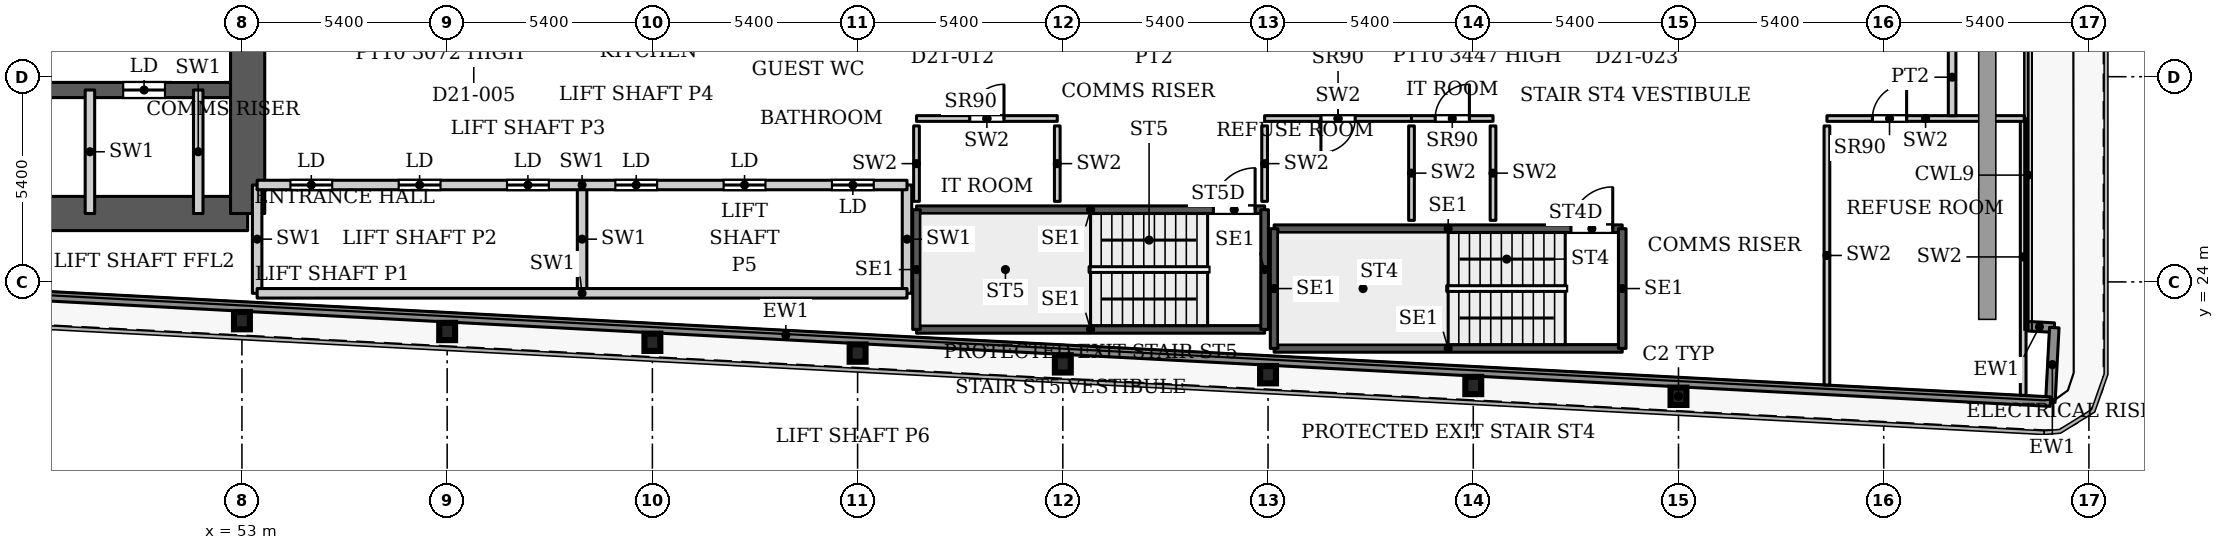
"""IFC4 building model, lengths in metres.
Left out: names, types, materials, properties, quantities, classifications, styles, units other than length and angle.
Written with IfcOpenShell. Run it as: python <this file> out.ifc"""

import sys

from ifc_helpers import new_model, si_unit, direction, frame, frame_2d, origin, origin_2d, place, context, subcontext, project, spatial, rectangle, i_section, extrude, source, transform, mapped, element, fill, save


model = new_model("IFC4")
c1 = context("Model", 3, precision=1e-05, world=origin(), true_north=direction((0.0, 1.0)))
c2 = subcontext(c1, "Body", "Model", "MODEL_VIEW")
j1 = project(units=[si_unit("LENGTHUNIT", "METRE"), si_unit("PLANEANGLEUNIT", "RADIAN")], contexts=[c1])
p1 = place(None, origin())
s1 = spatial("IfcSite", under=j1, at=p1, CompositionType="ELEMENT")
p2 = place(p1, origin())
s2 = spatial("IfcBuilding", under=s1, at=p2, CompositionType="ELEMENT")
p3 = place(p2, frame((0.0, 0.0, 98.0)))
s3 = spatial("IfcBuildingStorey", under=s2, at=p3, CompositionType="ELEMENT", Elevation=98.0)
for number, where, z_axis, x_axis in (
    (1, (90.8, 20.99, 0.0), (0.0, 0.0, 1.0), (1.0, 0.0, 0.0)),
    (2, (85.4, 21.274, 0.0), (0.0, 0.0, 1.0), (1.0, 0.0, 0.0)),
    (3, (80.0, 21.558, 0.0), (0.0, 0.0, 1.0), (1.0, 0.0, 0.0)),
    (4, (74.6, 21.843, 0.0), (0.0, 0.0, 1.0), (1.0, 0.0, 0.0)),
    (5, (69.2, 22.127, 0.0), (0.0, 0.0, 1.0), (1.0, 0.0, 0.0)),
    (6, (63.8, 22.411, 0.0), (0.0, 0.0, 1.0), (1.0, 0.0, 0.0)),
    (7, (58.4, 22.695, 0.0), (0.0, 0.0, 1.0), (1.0, 0.0, 0.0)),
    (8, (53.0, 22.98, 0.0), (0.0, 0.0, 1.0), (1.0, 0.0, 0.0)),
):
    element("IfcColumn", number, at=place(p3, frame(where, z_axis=z_axis, x_axis=x_axis)), inside=s3, PredefinedType="COLUMN", context=c2, shape_type="SweptSolid", body=[
        extrude(i_section(OverallWidth=0.418, OverallDepth=0.455, WebThickness=0.042, FlangeThickness=0.068, FilletRadius=0.014, at=origin_2d()), origin(), (0.0, 0.0, 1.0), 3.9),
    ])
p4 = place(p3, frame((34.75, 25.8, 0.0), z_axis=(0.0, 0.0, 1.0), x_axis=(1.0, 0.0, 0.0)))
e9 = element("IfcWall", 9, at=p4, inside=s3, PredefinedType="SHEAR", context=c2, shape_type="SweptSolid", body=[
    extrude(rectangle(XDim=18.4, YDim=0.9, at=frame_2d((9.2, 0.0))), origin(), (0.0, 0.0, 1.0), 3.9),
])
p5 = place(p3, frame((34.75, 29.05, 0.0), z_axis=(0.0, 0.0, 1.0), x_axis=(1.0, 0.0, 0.0)))
e10 = element("IfcWall", 10, at=p5, inside=s3, PredefinedType="SHEAR", context=c2, shape_type="SweptSolid", body=[
    extrude(rectangle(XDim=18.4, YDim=0.4, at=frame_2d((9.2, 0.0))), origin(), (0.0, 0.0, 1.0), 3.9),
])
p6 = place(p5, frame((15.125, 0.0, 0.0)))
e11 = element("IfcOpeningElement", 11, at=p6, cuts=e10, PredefinedType="OPENING", context=c2, shape_type="SweptSolid", body=[
    extrude(rectangle(XDim=1.1, YDim=2.2, at=frame_2d((0.55, 1.1))), frame((0.0, 0.21, 0.0), z_axis=(0.0, -1.0, 0.0), x_axis=(1.0, 0.0, 0.0)), (0.0, 0.0, 1.0), 0.42),
])
p7 = place(p3, frame((53.15, 25.8, 0.0), z_axis=(0.0, 0.0, 1.0), x_axis=(0.0, 1.0, 0.0)))
e12 = element("IfcWall", 12, at=p7, inside=s3, PredefinedType="SHEAR", context=c2, shape_type="SweptSolid", body=[
    extrude(rectangle(XDim=10.4, YDim=0.9, at=frame_2d((5.2, 0.0))), origin(), (0.0, 0.0, 1.0), 3.9),
])
p8 = place(p3, frame((99.907, 22.839, 0.0), z_axis=(0.0, 0.0, 1.0), x_axis=(0.998561284263, -0.053622398031, 0.0)))
e13 = element("IfcWall", 13, at=p8, inside=s3, PredefinedType="SOLIDWALL", context=c2, shape_type="SweptSolid", body=[
    extrude(rectangle(XDim=0.783, YDim=0.25, at=frame_2d((0.392, 0.0))), origin(), (0.0, 0.0, 1.0), 3.75),
])
p9 = place(p3, frame((100.689, 22.797, 0.0), z_axis=(0.0, 0.0, 1.0), x_axis=(-0.052841433274, -0.998602915542, 0.0)))
e14 = element("IfcWall", 14, at=p9, inside=s3, PredefinedType="SOLIDWALL", context=c2, shape_type="SweptSolid", body=[
    extrude(rectangle(XDim=1.95, YDim=0.25, at=frame_2d((0.975, 0.0))), origin(), (0.0, 0.0, 1.0), 3.75),
])
p10 = place(p3, frame((100.586, 20.85, 0.0), z_axis=(0.0, 0.0, 1.0), x_axis=(-0.99861746497, 0.052565755559, 0.0)))
e15 = element("IfcWall", 15, at=p10, inside=s3, PredefinedType="SOLIDWALL", context=c2, shape_type="SweptSolid", body=[
    extrude(rectangle(XDim=66.639, YDim=0.25, at=frame_2d((33.319, 0.0))), origin(), (0.0, 0.0, 1.0), 3.75),
])
p11 = place(p3, frame((80.16, 22.25, 0.0), z_axis=(0.0, 0.0, 1.0), x_axis=(1.0, 0.0, 0.0)))
e16 = element("IfcWall", 16, at=p11, inside=s3, PredefinedType="SHEAR", context=c2, shape_type="SweptSolid", body=[
    extrude(rectangle(XDim=9.16, YDim=0.2, at=frame_2d((4.58, 0.0))), origin(), (0.0, 0.0, 1.0), 3.9),
])
p12 = place(p3, frame((80.16, 25.4, 0.0), z_axis=(0.0, 0.0, 1.0), x_axis=(1.0, 0.0, 0.0)))
e17 = element("IfcWall", 17, at=p12, inside=s3, PredefinedType="SHEAR", context=c2, shape_type="SweptSolid", body=[
    extrude(rectangle(XDim=9.16, YDim=0.2, at=frame_2d((4.58, 0.0))), origin(), (0.0, 0.0, 1.0), 3.9),
])
p13 = place(p12, frame((7.81, 0.0, 0.0)))
e18 = element("IfcOpeningElement", 18, at=p13, cuts=e17, PredefinedType="OPENING", context=c2, shape_type="SweptSolid", body=[
    extrude(rectangle(XDim=1.1, YDim=2.2, at=frame_2d((0.55, 1.1))), frame((0.0, 0.11, 0.0), z_axis=(0.0, -1.0, 0.0), x_axis=(1.0, 0.0, 0.0)), (0.0, 0.0, 1.0), 0.22),
])
for number, where, z_axis, x_axis in (
    (19, (80.16, 22.25, 0.0), (0.0, 0.0, 1.0), (0.0, 1.0, 0.0)),
    (20, (89.32, 22.25, 0.0), (0.0, 0.0, 1.0), (0.0, 1.0, 0.0)),
):
    element("IfcWall", number, at=place(p3, frame(where, z_axis=z_axis, x_axis=x_axis)), inside=s3, PredefinedType="SHEAR", context=c2, shape_type="SweptSolid", body=[
        extrude(rectangle(XDim=3.15, YDim=0.2, at=frame_2d((1.575, 0.0))), origin(), (0.0, 0.0, 1.0), 3.9),
    ])
p14 = place(p3, frame((70.75, 22.75, 0.0), z_axis=(0.0, 0.0, 1.0), x_axis=(1.0, 0.0, 0.0)))
e21 = element("IfcWall", 21, at=p14, inside=s3, PredefinedType="SHEAR", context=c2, shape_type="SweptSolid", body=[
    extrude(rectangle(XDim=9.16, YDim=0.2, at=frame_2d((4.58, 0.0))), origin(), (0.0, 0.0, 1.0), 3.9),
])
p15 = place(p3, frame((70.75, 25.9, 0.0), z_axis=(0.0, 0.0, 1.0), x_axis=(1.0, 0.0, 0.0)))
e22 = element("IfcWall", 22, at=p15, inside=s3, PredefinedType="SHEAR", context=c2, shape_type="SweptSolid", body=[
    extrude(rectangle(XDim=9.16, YDim=0.2, at=frame_2d((4.58, 0.0))), origin(), (0.0, 0.0, 1.0), 3.9),
])
p16 = place(p15, frame((7.81, 0.0, 0.0)))
e23 = element("IfcOpeningElement", 23, at=p16, cuts=e22, PredefinedType="OPENING", context=c2, shape_type="SweptSolid", body=[
    extrude(rectangle(XDim=1.1, YDim=2.2, at=frame_2d((0.55, 1.1))), frame((0.0, 0.11, 0.0), z_axis=(0.0, -1.0, 0.0), x_axis=(1.0, 0.0, 0.0)), (0.0, 0.0, 1.0), 0.22),
])
for number, where, z_axis, x_axis in (
    (24, (70.75, 22.75, 0.0), (0.0, 0.0, 1.0), (0.0, 1.0, 0.0)),
    (25, (79.91, 22.75, 0.0), (0.0, 0.0, 1.0), (0.0, 1.0, 0.0)),
):
    element("IfcWall", number, at=place(p3, frame(where, z_axis=z_axis, x_axis=x_axis)), inside=s3, PredefinedType="SHEAR", context=c2, shape_type="SweptSolid", body=[
        extrude(rectangle(XDim=3.15, YDim=0.2, at=frame_2d((1.575, 0.0))), origin(), (0.0, 0.0, 1.0), 3.9),
    ])
for number, where, z_axis, x_axis in (
    (26, (49.0, 25.8, 0.0), (0.0, 0.0, 1.0), (0.0, 1.0, 0.0)),
    (27, (51.85, 25.8, 0.0), (0.0, 0.0, 1.0), (0.0, 1.0, 0.0)),
):
    element("IfcWall", number, at=place(p3, frame(where, z_axis=z_axis, x_axis=x_axis)), inside=s3, PredefinedType="PARTITIONING", context=c2, shape_type="SweptSolid", body=[
        extrude(rectangle(XDim=3.25, YDim=0.25, at=frame_2d((1.625, 0.0))), origin(), (0.0, 0.0, 1.0), 3.9),
    ])
for number, where, z_axis, x_axis in (
    (28, (53.4, 23.7, 0.0), (0.0, 0.0, 1.0), (0.0, 1.0, 0.0)),
    (29, (61.95, 23.7, 0.0), (0.0, 0.0, 1.0), (0.0, 1.0, 0.0)),
    (30, (70.5, 23.7, 0.0), (0.0, 0.0, 1.0), (0.0, 1.0, 0.0)),
):
    element("IfcWall", number, at=place(p3, frame(where, z_axis=z_axis, x_axis=x_axis)), inside=s3, PredefinedType="PARTITIONING", context=c2, shape_type="SweptSolid", body=[
        extrude(rectangle(XDim=2.85, YDim=0.25, at=frame_2d((1.425, 0.0))), origin(), (0.0, 0.0, 1.0), 3.9),
    ])
p17 = place(p3, frame((53.4, 23.7, 0.0), z_axis=(0.0, 0.0, 1.0), x_axis=(1.0, 0.0, 0.0)))
e31 = element("IfcWall", 31, at=p17, inside=s3, PredefinedType="PARTITIONING", context=c2, shape_type="SweptSolid", body=[
    extrude(rectangle(XDim=17.1, YDim=0.25, at=frame_2d((8.55, 0.0))), origin(), (0.0, 0.0, 1.0), 3.9),
])
p18 = place(p3, frame((53.4, 26.55, 0.0), z_axis=(0.0, 0.0, 1.0), x_axis=(1.0, 0.0, 0.0)))
e32 = element("IfcWall", 32, at=p18, inside=s3, PredefinedType="PARTITIONING", context=c2, shape_type="SweptSolid", body=[
    extrude(rectangle(XDim=17.1, YDim=0.25, at=frame_2d((8.55, 0.0))), origin(), (0.0, 0.0, 1.0), 3.9),
])
p19 = place(p18, frame((0.875, 0.0, 0.0)))
e33 = element("IfcOpeningElement", 33, at=p19, cuts=e32, PredefinedType="OPENING", context=c2, shape_type="SweptSolid", body=[
    extrude(rectangle(XDim=1.1, YDim=2.2, at=frame_2d((0.55, 1.1))), frame((0.0, 0.135, 0.0), z_axis=(0.0, -1.0, 0.0), x_axis=(1.0, 0.0, 0.0)), (0.0, 0.0, 1.0), 0.27),
])
p20 = place(p18, frame((3.725, 0.0, 0.0)))
e34 = element("IfcOpeningElement", 34, at=p20, cuts=e32, PredefinedType="OPENING", context=c2, shape_type="SweptSolid", body=[
    extrude(rectangle(XDim=1.1, YDim=2.2, at=frame_2d((0.55, 1.1))), frame((0.0, 0.135, 0.0), z_axis=(0.0, -1.0, 0.0), x_axis=(1.0, 0.0, 0.0)), (0.0, 0.0, 1.0), 0.27),
])
p21 = place(p18, frame((6.575, 0.0, 0.0)))
e35 = element("IfcOpeningElement", 35, at=p21, cuts=e32, PredefinedType="OPENING", context=c2, shape_type="SweptSolid", body=[
    extrude(rectangle(XDim=1.1, YDim=2.2, at=frame_2d((0.55, 1.1))), frame((0.0, 0.135, 0.0), z_axis=(0.0, -1.0, 0.0), x_axis=(1.0, 0.0, 0.0)), (0.0, 0.0, 1.0), 0.27),
])
p22 = place(p18, frame((9.425, 0.0, 0.0)))
e36 = element("IfcOpeningElement", 36, at=p22, cuts=e32, PredefinedType="OPENING", context=c2, shape_type="SweptSolid", body=[
    extrude(rectangle(XDim=1.1, YDim=2.2, at=frame_2d((0.55, 1.1))), frame((0.0, 0.135, 0.0), z_axis=(0.0, -1.0, 0.0), x_axis=(1.0, 0.0, 0.0)), (0.0, 0.0, 1.0), 0.27),
])
p23 = place(p18, frame((12.275, 0.0, 0.0)))
e37 = element("IfcOpeningElement", 37, at=p23, cuts=e32, PredefinedType="OPENING", context=c2, shape_type="SweptSolid", body=[
    extrude(rectangle(XDim=1.1, YDim=2.2, at=frame_2d((0.55, 1.1))), frame((0.0, 0.135, 0.0), z_axis=(0.0, -1.0, 0.0), x_axis=(1.0, 0.0, 0.0)), (0.0, 0.0, 1.0), 0.27),
])
p24 = place(p18, frame((15.125, 0.0, 0.0)))
e38 = element("IfcOpeningElement", 38, at=p24, cuts=e32, PredefinedType="OPENING", context=c2, shape_type="SweptSolid", body=[
    extrude(rectangle(XDim=1.1, YDim=2.2, at=frame_2d((0.55, 1.1))), frame((0.0, 0.135, 0.0), z_axis=(0.0, -1.0, 0.0), x_axis=(1.0, 0.0, 0.0)), (0.0, 0.0, 1.0), 0.27),
])
p25 = place(p3, frame((70.75, 28.3, 0.0), z_axis=(0.0, 0.0, 1.0), x_axis=(1.0, 0.0, 0.0)))
e39 = element("IfcWall", 39, at=p25, inside=s3, PredefinedType="PARTITIONING", context=c2, shape_type="SweptSolid", body=[
    extrude(rectangle(XDim=3.704, YDim=0.15, at=frame_2d((1.852, 0.0))), origin(), (0.0, 0.0, 1.0), 3.9),
])
p26 = place(p25, frame((1.402, 0.0, 0.0)))
e40 = element("IfcOpeningElement", 40, at=p26, cuts=e39, PredefinedType="OPENING", context=c2, shape_type="SweptSolid", body=[
    extrude(rectangle(XDim=0.9, YDim=2.2, at=frame_2d((0.45, 1.1))), frame((0.0, 0.085, 0.0), z_axis=(0.0, -1.0, 0.0), x_axis=(1.0, 0.0, 0.0)), (0.0, 0.0, 1.0), 0.17),
])
for number, where, z_axis, x_axis in (
    (41, (70.75, 26.12, 0.0), (0.0, 0.0, 1.0), (0.0, 1.0, 0.0)),
    (42, (74.454, 26.12, 0.0), (0.0, 0.0, 1.0), (0.0, 1.0, 0.0)),
):
    element("IfcWall", number, at=place(p3, frame(where, z_axis=z_axis, x_axis=x_axis)), inside=s3, PredefinedType="PARTITIONING", context=c2, shape_type="SweptSolid", body=[
        extrude(rectangle(XDim=1.985, YDim=0.15, at=frame_2d((0.992, 0.0))), origin(), (0.0, 0.0, 1.0), 3.9),
    ])
p27 = place(p3, frame((79.91, 28.3, 0.0), z_axis=(0.0, 0.0, 1.0), x_axis=(1.0, 0.0, 0.0)))
e43 = element("IfcWall", 43, at=p27, inside=s3, PredefinedType="PARTITIONING", context=c2, shape_type="SweptSolid", body=[
    extrude(rectangle(XDim=3.865, YDim=0.15, at=frame_2d((1.933, 0.0))), origin(), (0.0, 0.0, 1.0), 3.9),
])
p28 = place(p27, frame((1.482, 0.0, 0.0)))
e44 = element("IfcOpeningElement", 44, at=p28, cuts=e43, PredefinedType="OPENING", context=c2, shape_type="SweptSolid", body=[
    extrude(rectangle(XDim=0.9, YDim=2.2, at=frame_2d((0.45, 1.1))), frame((0.0, 0.085, 0.0), z_axis=(0.0, -1.0, 0.0), x_axis=(1.0, 0.0, 0.0)), (0.0, 0.0, 1.0), 0.17),
])
p29 = place(p3, frame((79.91, 26.12, 0.0), z_axis=(0.0, 0.0, 1.0), x_axis=(0.0, 1.0, 0.0)))
e45 = element("IfcWall", 45, at=p29, inside=s3, PredefinedType="PARTITIONING", context=c2, shape_type="SweptSolid", body=[
    extrude(rectangle(XDim=1.985, YDim=0.15, at=frame_2d((0.992, 0.0))), origin(), (0.0, 0.0, 1.0), 3.9),
])
p30 = place(p3, frame((83.775, 25.62, 0.0), z_axis=(0.0, 0.0, 1.0), x_axis=(0.0, 1.0, 0.0)))
e46 = element("IfcWall", 46, at=p30, inside=s3, PredefinedType="PARTITIONING", context=c2, shape_type="SweptSolid", body=[
    extrude(rectangle(XDim=2.485, YDim=0.15, at=frame_2d((1.242, 0.0))), origin(), (0.0, 0.0, 1.0), 3.9),
])
p31 = place(p3, frame((83.775, 28.3, 0.0), z_axis=(0.0, 0.0, 1.0), x_axis=(1.0, 0.0, 0.0)))
e47 = element("IfcWall", 47, at=p31, inside=s3, PredefinedType="PARTITIONING", context=c2, shape_type="SweptSolid", body=[
    extrude(rectangle(XDim=2.145, YDim=0.15, at=frame_2d((1.073, 0.0))), origin(), (0.0, 0.0, 1.0), 3.9),
])
p32 = place(p31, frame((0.623, 0.0, 0.0)))
e48 = element("IfcOpeningElement", 48, at=p32, cuts=e47, PredefinedType="OPENING", context=c2, shape_type="SweptSolid", body=[
    extrude(rectangle(XDim=0.9, YDim=2.2, at=frame_2d((0.45, 1.1))), frame((0.0, 0.085, 0.0), z_axis=(0.0, -1.0, 0.0), x_axis=(1.0, 0.0, 0.0)), (0.0, 0.0, 1.0), 0.17),
])
p33 = place(p3, frame((85.92, 25.62, 0.0), z_axis=(0.0, 0.0, 1.0), x_axis=(0.0, 1.0, 0.0)))
e49 = element("IfcWall", 49, at=p33, inside=s3, PredefinedType="PARTITIONING", context=c2, shape_type="SweptSolid", body=[
    extrude(rectangle(XDim=2.485, YDim=0.15, at=frame_2d((1.242, 0.0))), origin(), (0.0, 0.0, 1.0), 3.9),
])
p34 = place(p3, frame((99.87, 21.015, 0.0), z_axis=(0.0, 0.0, 1.0), x_axis=(0.0, 1.0, 0.0)))
e50 = element("IfcWall", 50, at=p34, inside=s3, PredefinedType="PARTITIONING", context=c2, shape_type="SweptSolid", body=[
    extrude(rectangle(XDim=7.285, YDim=0.15, at=frame_2d((3.643, 0.0))), origin(), (0.0, 0.0, 1.0), 3.9),
])
p35 = place(p3, frame((94.706, 28.3, 0.0), z_axis=(0.0, 0.0, 1.0), x_axis=(1.0, 0.0, 0.0)))
e51 = element("IfcWall", 51, at=p35, inside=s3, PredefinedType="PARTITIONING", context=c2, shape_type="SweptSolid", body=[
    extrude(rectangle(XDim=5.192, YDim=0.15, at=frame_2d((2.596, 0.0))), origin(), (0.0, 0.0, 1.0), 3.9),
])
p36 = place(p35, frame((1.197, 0.0, 0.0)))
e52 = element("IfcOpeningElement", 52, at=p36, cuts=e51, PredefinedType="OPENING", context=c2, shape_type="SweptSolid", body=[
    extrude(rectangle(XDim=0.9, YDim=2.2, at=frame_2d((0.45, 1.1))), frame((0.0, 0.085, 0.0), z_axis=(0.0, -1.0, 0.0), x_axis=(1.0, 0.0, 0.0)), (0.0, 0.0, 1.0), 0.17),
])
p37 = place(p3, frame((94.706, 21.287, 0.0), z_axis=(0.0, 0.0, 1.0), x_axis=(0.0, 1.0, 0.0)))
e53 = element("IfcWall", 53, at=p37, inside=s3, PredefinedType="PARTITIONING", context=c2, shape_type="SweptSolid", body=[
    extrude(rectangle(XDim=6.818, YDim=0.15, at=frame_2d((3.409, 0.0))), origin(), (0.0, 0.0, 1.0), 3.9),
])
p38 = place(p3, frame((98.0, 28.374, 0.0), z_axis=(0.0, 0.0, 1.0), x_axis=(0.0, 1.0, 0.0)))
e54 = element("IfcWall", 54, at=p38, inside=s3, PredefinedType="PARTITIONING", context=c2, shape_type="SweptSolid", body=[
    extrude(rectangle(XDim=2.026, YDim=0.2, at=frame_2d((1.013, 0.0))), origin(), (0.0, 0.0, 1.0), 3.6),
])
m1 = source(origin(), c2, "Body", "SweptSolid", [
    extrude(rectangle(XDim=1.1, YDim=2.2, at=frame_2d((0.55, 1.1))), frame((0.0, 0.025, 0.0), z_axis=(0.0, -1.0, 0.0), x_axis=(1.0, 0.0, 0.0)), (0.0, 0.0, 1.0), 0.05),
])
p39 = place(p19, origin())
e55 = element("IfcDoor", 55, at=p39, inside=s3, OperationType="SLIDING_TO_LEFT", PredefinedType="DOOR", context=c2, shape_type="MappedRepresentation", body=[
    mapped(m1, transform((0.0, 0.0, 0.0), x_axis=(1.0, 0.0, 0.0), y_axis=(0.0, 1.0, 0.0), z_axis=(0.0, 0.0, 1.0), scale=1.0)),
])
fill(e33, e55)
p40 = place(p20, origin())
e56 = element("IfcDoor", 56, at=p40, inside=s3, OperationType="SLIDING_TO_LEFT", PredefinedType="DOOR", context=c2, shape_type="MappedRepresentation", body=[
    mapped(m1, transform((0.0, 0.0, 0.0), x_axis=(1.0, 0.0, 0.0), y_axis=(0.0, 1.0, 0.0), z_axis=(0.0, 0.0, 1.0), scale=1.0)),
])
fill(e34, e56)
p41 = place(p21, origin())
e57 = element("IfcDoor", 57, at=p41, inside=s3, OperationType="SLIDING_TO_LEFT", PredefinedType="DOOR", context=c2, shape_type="MappedRepresentation", body=[
    mapped(m1, transform((0.0, 0.0, 0.0), x_axis=(1.0, 0.0, 0.0), y_axis=(0.0, 1.0, 0.0), z_axis=(0.0, 0.0, 1.0), scale=1.0)),
])
fill(e35, e57)
p42 = place(p22, origin())
e58 = element("IfcDoor", 58, at=p42, inside=s3, OperationType="SLIDING_TO_LEFT", PredefinedType="DOOR", context=c2, shape_type="MappedRepresentation", body=[
    mapped(m1, transform((0.0, 0.0, 0.0), x_axis=(1.0, 0.0, 0.0), y_axis=(0.0, 1.0, 0.0), z_axis=(0.0, 0.0, 1.0), scale=1.0)),
])
fill(e36, e58)
p43 = place(p23, origin())
e59 = element("IfcDoor", 59, at=p43, inside=s3, OperationType="SLIDING_TO_LEFT", PredefinedType="DOOR", context=c2, shape_type="MappedRepresentation", body=[
    mapped(m1, transform((0.0, 0.0, 0.0), x_axis=(1.0, 0.0, 0.0), y_axis=(0.0, 1.0, 0.0), z_axis=(0.0, 0.0, 1.0), scale=1.0)),
])
fill(e37, e59)
p44 = place(p24, origin())
e60 = element("IfcDoor", 60, at=p44, inside=s3, OperationType="SLIDING_TO_LEFT", PredefinedType="DOOR", context=c2, shape_type="MappedRepresentation", body=[
    mapped(m1, transform((0.0, 0.0, 0.0), x_axis=(1.0, 0.0, 0.0), y_axis=(0.0, 1.0, 0.0), z_axis=(0.0, 0.0, 1.0), scale=1.0)),
])
fill(e38, e60)
p45 = place(p6, origin())
e61 = element("IfcDoor", 61, at=p45, inside=s3, OperationType="SLIDING_TO_LEFT", PredefinedType="DOOR", context=c2, shape_type="MappedRepresentation", body=[
    mapped(m1, transform((0.0, 0.0, 0.0), x_axis=(1.0, 0.0, 0.0), y_axis=(0.0, 1.0, 0.0), z_axis=(0.0, 0.0, 1.0), scale=1.0)),
])
fill(e11, e61)
m2 = source(origin(), c2, "Body", "SweptSolid", [
    extrude(rectangle(XDim=0.9, YDim=2.2, at=frame_2d((0.45, 1.1))), frame((0.0, 0.025, 0.0), z_axis=(0.0, -1.0, 0.0), x_axis=(1.0, 0.0, 0.0)), (0.0, 0.0, 1.0), 0.05),
])
p46 = place(p26, origin())
e62 = element("IfcDoor", 62, at=p46, inside=s3, OperationType="SINGLE_SWING_LEFT", PredefinedType="DOOR", context=c2, shape_type="MappedRepresentation", body=[
    mapped(m2, transform((0.0, 0.0, 0.0), x_axis=(1.0, 0.0, 0.0), y_axis=(0.0, 1.0, 0.0), z_axis=(0.0, 0.0, 1.0), scale=1.0)),
])
fill(e40, e62)
p47 = place(p28, origin())
e63 = element("IfcDoor", 63, at=p47, inside=s3, OperationType="SINGLE_SWING_RIGHT", PredefinedType="DOOR", context=c2, shape_type="MappedRepresentation", body=[
    mapped(m2, transform((0.0, 0.0, 0.0), x_axis=(1.0, 0.0, 0.0), y_axis=(0.0, 1.0, 0.0), z_axis=(0.0, 0.0, 1.0), scale=1.0)),
])
fill(e44, e63)
p48 = place(p32, origin())
e64 = element("IfcDoor", 64, at=p48, inside=s3, OperationType="SINGLE_SWING_LEFT", PredefinedType="DOOR", context=c2, shape_type="MappedRepresentation", body=[
    mapped(m2, transform((0.0, 0.0, 0.0), x_axis=(1.0, 0.0, 0.0), y_axis=(0.0, 1.0, 0.0), z_axis=(0.0, 0.0, 1.0), scale=1.0)),
])
fill(e48, e64)
p49 = place(p36, origin())
e65 = element("IfcDoor", 65, at=p49, inside=s3, OperationType="SINGLE_SWING_LEFT", PredefinedType="DOOR", context=c2, shape_type="MappedRepresentation", body=[
    mapped(m2, transform((0.0, 0.0, 0.0), x_axis=(1.0, 0.0, 0.0), y_axis=(0.0, 1.0, 0.0), z_axis=(0.0, 0.0, 1.0), scale=1.0)),
])
fill(e52, e65)
m3 = source(origin(), c2, "Body", "SweptSolid", [
    extrude(rectangle(XDim=1.1, YDim=2.2, at=frame_2d((0.55, 1.1))), frame((0.0, 0.025, 0.0), z_axis=(0.0, -1.0, 0.0), x_axis=(1.0, 0.0, 0.0)), (0.0, 0.0, 1.0), 0.05),
])
p50 = place(p13, origin())
e66 = element("IfcDoor", 66, at=p50, inside=s3, OperationType="SINGLE_SWING_LEFT", PredefinedType="DOOR", context=c2, shape_type="MappedRepresentation", body=[
    mapped(m3, transform((0.0, 0.0, 0.0), x_axis=(1.0, 0.0, 0.0), y_axis=(0.0, 1.0, 0.0), z_axis=(0.0, 0.0, 1.0), scale=1.0)),
])
fill(e18, e66)
p51 = place(p16, origin())
e67 = element("IfcDoor", 67, at=p51, inside=s3, OperationType="SINGLE_SWING_LEFT", PredefinedType="DOOR", context=c2, shape_type="MappedRepresentation", body=[
    mapped(m3, transform((0.0, 0.0, 0.0), x_axis=(1.0, 0.0, 0.0), y_axis=(0.0, 1.0, 0.0), z_axis=(0.0, 0.0, 1.0), scale=1.0)),
])
fill(e23, e67)
save(model, sys.argv[1])
